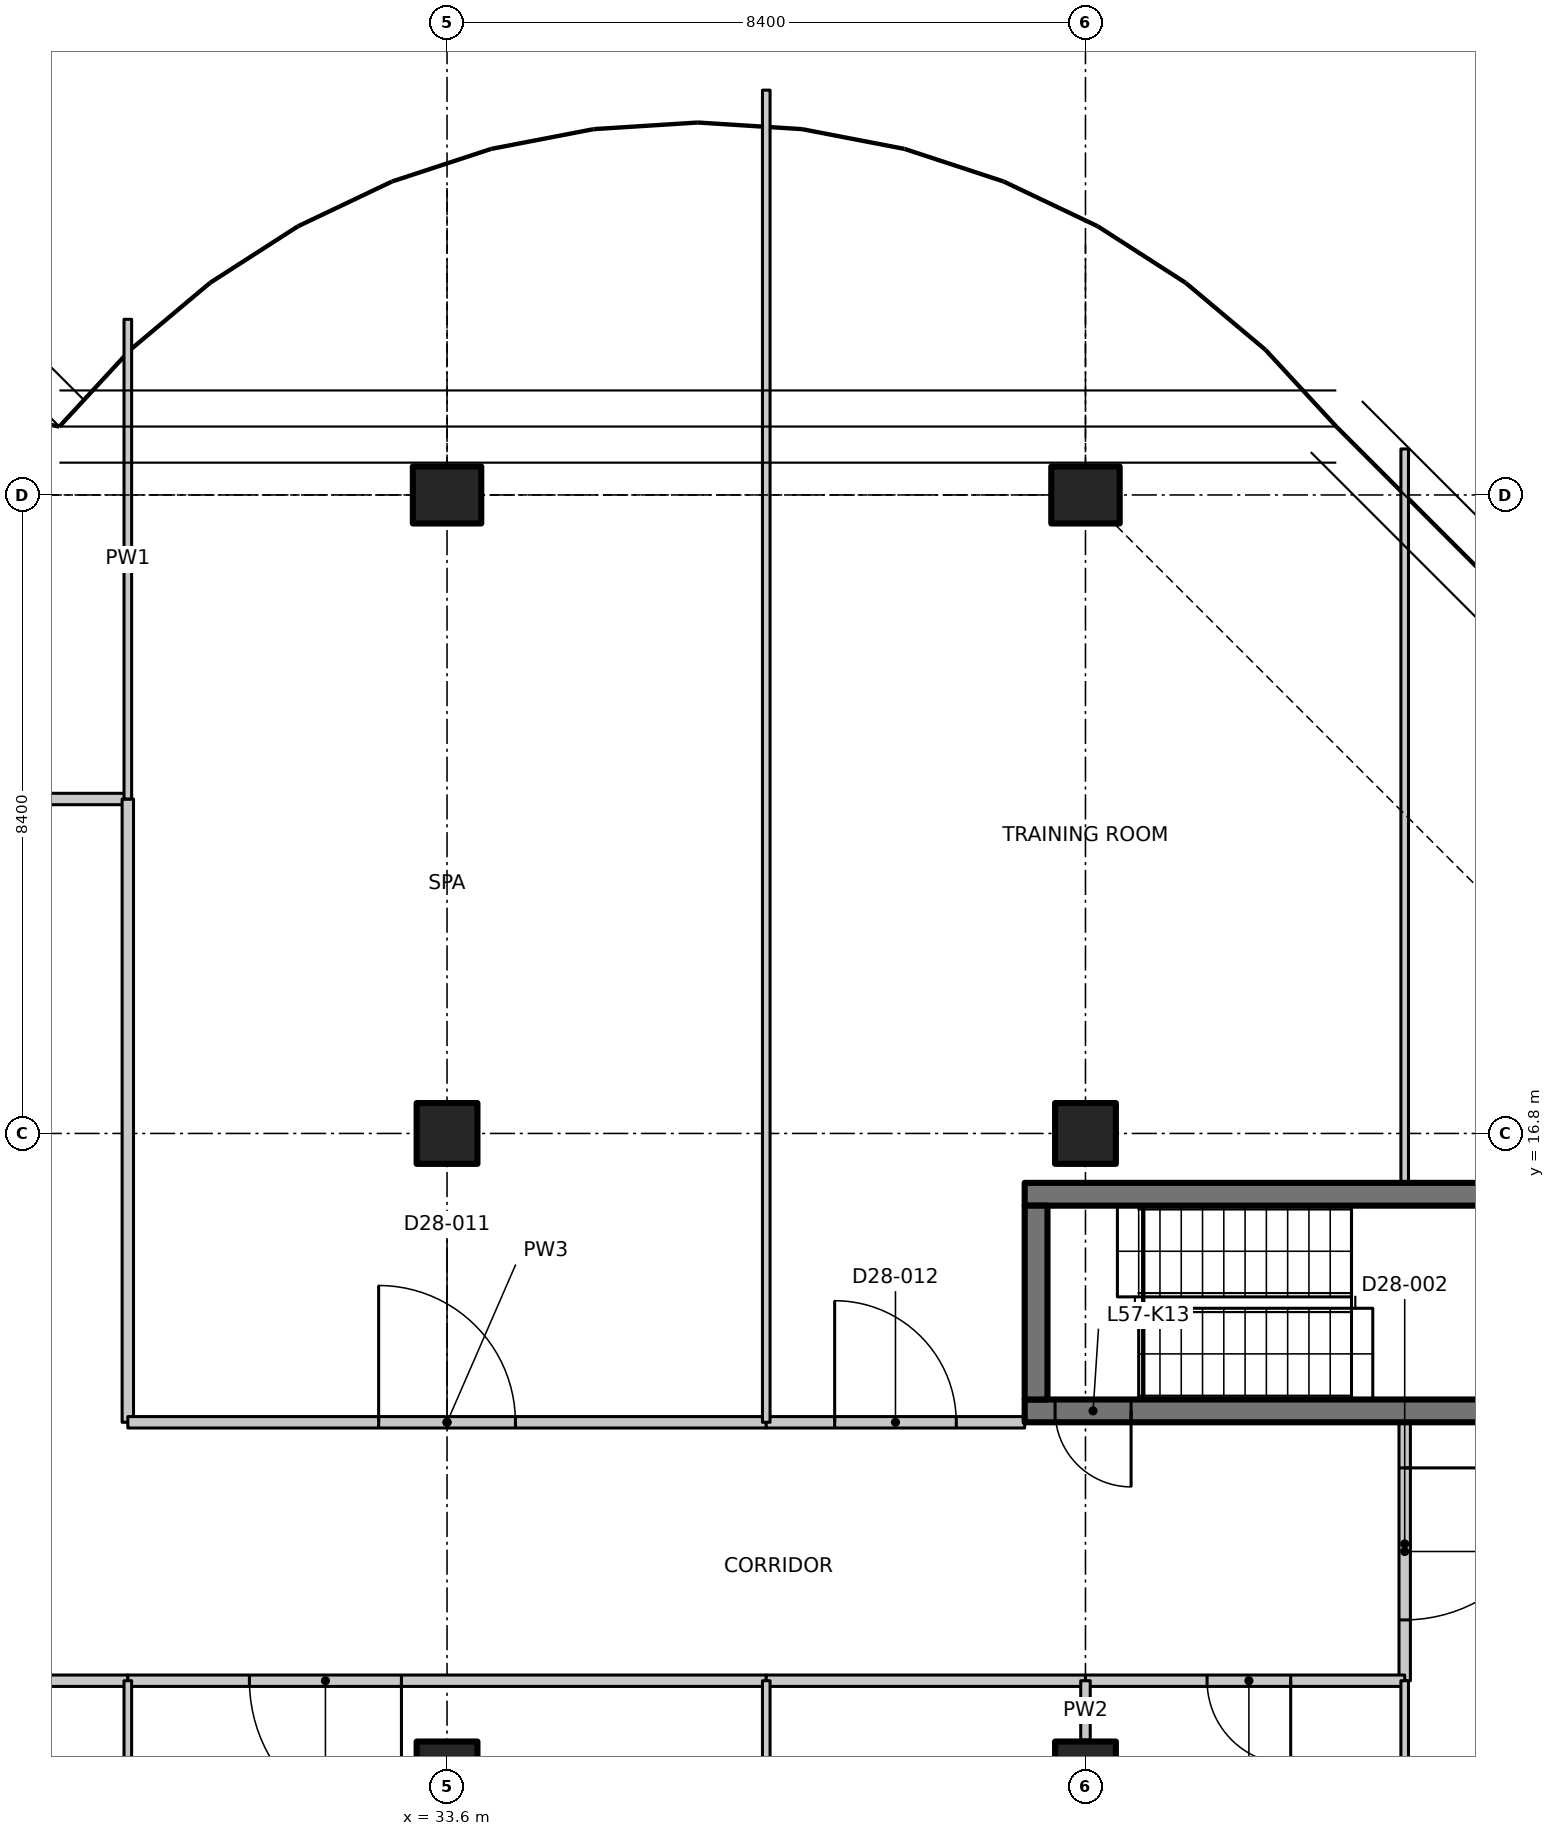
"""IFC4 building model, lengths in metres.
Left out: names, types, materials, properties, quantities, classifications, styles, units other than length and angle.
Written with IfcOpenShell. Run it as: python <this file> out.ifc"""

import sys

from ifc_helpers import new_model, si_unit, direction, frame, frame_2d, origin, origin_2d, place, context, subcontext, project, spatial, polyline, rectangle, outline, extrude, element, fill, save


model = new_model("IFC4")
c1 = context("Model", 3, precision=1e-05, world=origin(), true_north=direction((0.0, 1.0)))
c2 = subcontext(c1, "Body", "Model", "MODEL_VIEW")
j1 = project(units=[si_unit("LENGTHUNIT", "METRE"), si_unit("PLANEANGLEUNIT", "RADIAN")], contexts=[c1])
p1 = place(None, origin())
s1 = spatial("IfcSite", under=j1, at=p1, CompositionType="ELEMENT")
p2 = place(p1, origin())
s2 = spatial("IfcBuilding", under=s1, at=p2, CompositionType="ELEMENT")
p3 = place(p2, frame((0.0, 0.0, 226.5)))
s3 = spatial("IfcBuildingStorey", under=s2, at=p3, CompositionType="ELEMENT", Elevation=226.5)
for number, where, z_axis, x_axis in (
    (1, (33.6, 8.4, 0.0), (0.0, 0.0, 1.0), (1.0, 0.0, 0.0)),
    (2, (33.6, 16.8, 0.0), (0.0, 0.0, 1.0), (1.0, 0.0, 0.0)),
):
    element("IfcColumn", number, at=place(p3, frame(where, z_axis=z_axis, x_axis=x_axis)), inside=s3, PredefinedType="COLUMN", context=c2, shape_type="SweptSolid", body=[
        extrude(rectangle(XDim=0.8, YDim=0.8, at=origin_2d()), origin(), (0.0, 0.0, 1.0), 3.35),
    ])
p4 = place(p3, frame((33.6, 25.2, 0.0), z_axis=(0.0, 0.0, 1.0), x_axis=(0.0, 1.0, 0.0)))
e3 = element("IfcColumn", 3, at=p4, inside=s3, PredefinedType="COLUMN", context=c2, shape_type="SweptSolid", body=[
    extrude(rectangle(XDim=0.75, YDim=0.9, at=origin_2d()), origin(), (0.0, 0.0, 1.0), 3.35),
])
for number, where, z_axis, x_axis in (
    (4, (42.0, 8.4, 0.0), (0.0, 0.0, 1.0), (1.0, 0.0, 0.0)),
    (5, (42.0, 16.8, 0.0), (0.0, 0.0, 1.0), (1.0, 0.0, 0.0)),
):
    element("IfcColumn", number, at=place(p3, frame(where, z_axis=z_axis, x_axis=x_axis)), inside=s3, PredefinedType="COLUMN", context=c2, shape_type="SweptSolid", body=[
        extrude(rectangle(XDim=0.8, YDim=0.8, at=origin_2d()), origin(), (0.0, 0.0, 1.0), 3.35),
    ])
p5 = place(p3, frame((42.0, 25.2, 0.0), z_axis=(0.0, 0.0, 1.0), x_axis=(0.0, 1.0, 0.0)))
e6 = element("IfcColumn", 6, at=p5, inside=s3, PredefinedType="COLUMN", context=c2, shape_type="SweptSolid", body=[
    extrude(rectangle(XDim=0.75, YDim=0.9, at=origin_2d()), origin(), (0.0, 0.0, 1.0), 3.35),
])
p6 = place(p3, frame((49.4, 13.15, 0.0), z_axis=(0.0, 0.0, 1.0), x_axis=(-1.0, 0.0, 0.0)))
e7 = element("IfcWall", 7, at=p6, inside=s3, PredefinedType="SHEAR", context=c2, shape_type="SweptSolid", body=[
    extrude(rectangle(XDim=8.2, YDim=0.3, at=frame_2d((4.1, 0.0))), origin(), (0.0, 0.0, 1.0), 3.35),
])
p7 = place(p6, frame((6.8, 0.0, 0.0)))
e8 = element("IfcOpeningElement", 8, at=p7, cuts=e7, PredefinedType="OPENING", context=c2, shape_type="SweptSolid", body=[
    extrude(rectangle(XDim=1.0, YDim=2.1, at=frame_2d((0.5, 1.05))), frame((0.0, 0.16, 0.0), z_axis=(0.0, -1.0, 0.0), x_axis=(1.0, 0.0, 0.0)), (0.0, 0.0, 1.0), 0.32),
])
p8 = place(p3, frame((41.2, 16.0, 0.0), z_axis=(0.0, 0.0, 1.0), x_axis=(1.0, 0.0, 0.0)))
e9 = element("IfcWall", 9, at=p8, inside=s3, PredefinedType="SHEAR", context=c2, shape_type="SweptSolid", body=[
    extrude(rectangle(XDim=8.2, YDim=0.3, at=frame_2d((4.1, 0.0))), origin(), (0.0, 0.0, 1.0), 3.35),
])
p9 = place(p3, frame((41.35, 13.3, 0.0), z_axis=(0.0, 0.0, 1.0), x_axis=(0.0, 1.0, 0.0)))
e10 = element("IfcWall", 10, at=p9, inside=s3, PredefinedType="SHEAR", context=c2, shape_type="SweptSolid", body=[
    extrude(rectangle(XDim=2.55, YDim=0.3, at=frame_2d((1.275, 0.0))), origin(), (0.0, 0.0, 1.0), 3.35),
])
p10 = place(p3, frame((25.2, 21.2, 0.0), z_axis=(0.0, 0.0, 1.0), x_axis=(1.0, 0.0, 0.0)))
e11 = element("IfcWall", 11, at=p10, inside=s3, PredefinedType="PARTITIONING", context=c2, shape_type="SweptSolid", body=[
    extrude(rectangle(XDim=4.2, YDim=0.15, at=frame_2d((2.1, 0.0))), origin(), (0.0, 0.0, 1.0), 3.33),
])
p11 = place(p10, frame((1.5, 0.0, 0.0)))
e12 = element("IfcOpeningElement", 12, at=p11, cuts=e11, PredefinedType="OPENING", context=c2, shape_type="SweptSolid", body=[
    extrude(rectangle(XDim=1.0, YDim=2.1, at=frame_2d((0.5, 1.05))), frame((0.0, 0.085, 0.0), z_axis=(0.0, -1.0, 0.0), x_axis=(1.0, 0.0, 0.0)), (0.0, 0.0, 1.0), 0.17),
])
p12 = place(p3, frame((29.4, 9.6, 0.0), z_axis=(0.0, 0.0, 1.0), x_axis=(-1.0, 0.0, 0.0)))
e13 = element("IfcWall", 13, at=p12, inside=s3, PredefinedType="PARTITIONING", context=c2, shape_type="SweptSolid", body=[
    extrude(rectangle(XDim=4.2, YDim=0.15, at=frame_2d((2.1, 0.0))), origin(), (0.0, 0.0, 1.0), 3.33),
])
p13 = place(p3, frame((29.4, 21.2, 0.0), z_axis=(0.0, 0.0, 1.0), x_axis=(0.0, -1.0, 0.0)))
e14 = element("IfcWall", 14, at=p13, inside=s3, PredefinedType="PARTITIONING", context=c2, shape_type="SweptSolid", body=[
    extrude(rectangle(XDim=8.2, YDim=0.15, at=frame_2d((4.1, 0.0))), origin(), (0.0, 0.0, 1.0), 3.33),
])
p14 = place(p3, frame((29.4, 27.511, 0.0), z_axis=(0.0, 0.0, 1.0), x_axis=(0.0, -1.0, 0.0)))
e15 = element("IfcWall", 15, at=p14, inside=s3, PredefinedType="PARTITIONING", context=c2, shape_type="SweptSolid", body=[
    extrude(outline(polyline([(0.0, 0.0), (6.311, 0.0), (6.311, 3.33), (2.761, 3.33), (2.759, 2.98), (1.863, 2.98), (1.861, 3.33), (0.236, 3.33), (0.0, 3.33), (0.0, 0.0)])), frame((0.0, 0.05, 0.0), z_axis=(0.0, -1.0, 0.0), x_axis=(1.0, 0.0, 0.0)), (0.0, 0.0, 1.0), 0.1),
])
p15 = place(p3, frame((46.2, 13.0, 0.0), z_axis=(0.0, 0.0, 1.0), x_axis=(0.0, -1.0, 0.0)))
e16 = element("IfcWall", 16, at=p15, inside=s3, PredefinedType="PARTITIONING", context=c2, shape_type="SweptSolid", body=[
    extrude(rectangle(XDim=3.4, YDim=0.15, at=frame_2d((1.7, 0.0))), origin(), (0.0, 0.0, 1.0), 3.33),
])
p16 = place(p15, frame((0.6, 0.0, 0.0)))
e17 = element("IfcOpeningElement", 17, at=p16, cuts=e16, PredefinedType="OPENING", context=c2, shape_type="SweptSolid", body=[
    extrude(rectangle(XDim=2.0, YDim=2.4, at=frame_2d((1.0, 1.2))), frame((0.0, 0.085, 0.0), z_axis=(0.0, -1.0, 0.0), x_axis=(1.0, 0.0, 0.0)), (0.0, 0.0, 1.0), 0.17),
])
p17 = place(p3, frame((37.8, 9.6, 0.0), z_axis=(0.0, 0.0, 1.0), x_axis=(-1.0, 0.0, 0.0)))
e18 = element("IfcWall", 18, at=p17, inside=s3, PredefinedType="PARTITIONING", context=c2, shape_type="SweptSolid", body=[
    extrude(rectangle(XDim=8.4, YDim=0.15, at=frame_2d((4.2, 0.0))), origin(), (0.0, 0.0, 1.0), 3.33),
])
p18 = place(p17, frame((4.8, 0.0, 0.0)))
e19 = element("IfcOpeningElement", 19, at=p18, cuts=e18, PredefinedType="OPENING", context=c2, shape_type="SweptSolid", body=[
    extrude(rectangle(XDim=2.0, YDim=2.4, at=frame_2d((1.0, 1.2))), frame((0.0, 0.085, 0.0), z_axis=(0.0, -1.0, 0.0), x_axis=(1.0, 0.0, 0.0)), (0.0, 0.0, 1.0), 0.17),
])
p19 = place(p3, frame((42.0, 9.6, 0.0), z_axis=(0.0, 0.0, 1.0), x_axis=(-1.0, 0.0, 0.0)))
e20 = element("IfcWall", 20, at=p19, inside=s3, PredefinedType="PARTITIONING", context=c2, shape_type="SweptSolid", body=[
    extrude(rectangle(XDim=4.2, YDim=0.15, at=frame_2d((2.1, 0.0))), origin(), (0.0, 0.0, 1.0), 3.33),
])
p20 = place(p3, frame((46.2, 9.6, 0.0), z_axis=(0.0, 0.0, 1.0), x_axis=(-1.0, 0.0, 0.0)))
e21 = element("IfcWall", 21, at=p20, inside=s3, PredefinedType="PARTITIONING", context=c2, shape_type="SweptSolid", body=[
    extrude(rectangle(XDim=4.2, YDim=0.15, at=frame_2d((2.1, 0.0))), origin(), (0.0, 0.0, 1.0), 3.33),
])
p21 = place(p20, frame((1.5, 0.0, 0.0)))
e22 = element("IfcOpeningElement", 22, at=p21, cuts=e21, PredefinedType="OPENING", context=c2, shape_type="SweptSolid", body=[
    extrude(rectangle(XDim=1.1, YDim=2.1, at=frame_2d((0.55, 1.05))), frame((0.0, 0.085, 0.0), z_axis=(0.0, -1.0, 0.0), x_axis=(1.0, 0.0, 0.0)), (0.0, 0.0, 1.0), 0.17),
])
p22 = place(p3, frame((29.4, 13.0, 0.0), z_axis=(0.0, 0.0, 1.0), x_axis=(1.0, 0.0, 0.0)))
e23 = element("IfcWall", 23, at=p22, inside=s3, PredefinedType="PARTITIONING", context=c2, shape_type="SweptSolid", body=[
    extrude(rectangle(XDim=8.4, YDim=0.15, at=frame_2d((4.2, 0.0))), origin(), (0.0, 0.0, 1.0), 3.33),
])
p23 = place(p22, frame((3.3, 0.0, 0.0)))
e24 = element("IfcOpeningElement", 24, at=p23, cuts=e23, PredefinedType="OPENING", context=c2, shape_type="SweptSolid", body=[
    extrude(rectangle(XDim=1.8, YDim=2.1, at=frame_2d((0.9, 1.05))), frame((0.0, 0.085, 0.0), z_axis=(0.0, -1.0, 0.0), x_axis=(1.0, 0.0, 0.0)), (0.0, 0.0, 1.0), 0.17),
])
p24 = place(p3, frame((37.8, 13.0, 0.0), z_axis=(0.0, 0.0, 1.0), x_axis=(1.0, 0.0, 0.0)))
e25 = element("IfcWall", 25, at=p24, inside=s3, PredefinedType="PARTITIONING", context=c2, shape_type="SweptSolid", body=[
    extrude(rectangle(XDim=3.4, YDim=0.15, at=frame_2d((1.7, 0.0))), origin(), (0.0, 0.0, 1.0), 3.33),
])
p25 = place(p24, frame((0.9, 0.0, 0.0)))
e26 = element("IfcOpeningElement", 26, at=p25, cuts=e25, PredefinedType="OPENING", context=c2, shape_type="SweptSolid", body=[
    extrude(rectangle(XDim=1.6, YDim=2.1, at=frame_2d((0.8, 1.05))), frame((0.0, 0.085, 0.0), z_axis=(0.0, -1.0, 0.0), x_axis=(1.0, 0.0, 0.0)), (0.0, 0.0, 1.0), 0.17),
])
p26 = place(p3, frame((46.2, -0.2, 0.0), z_axis=(0.0, 0.0, 1.0), x_axis=(0.0, 1.0, 0.0)))
e27 = element("IfcWall", 27, at=p26, inside=s3, PredefinedType="PARTITIONING", context=c2, shape_type="SweptSolid", body=[
    extrude(outline(polyline([(0.0, 0.0), (9.8, 0.0), (9.8, 3.33), (5.066, 3.33), (5.064, 2.98), (3.736, 2.98), (3.734, 3.33), (0.0, 3.33), (0.0, 0.0)])), frame((0.0, 0.05, 0.0), z_axis=(0.0, -1.0, 0.0), x_axis=(1.0, 0.0, 0.0)), (0.0, 0.0, 1.0), 0.1),
])
p27 = place(p3, frame((46.2, 16.15, 0.0), z_axis=(0.0, 0.0, 1.0), x_axis=(0.0, 1.0, 0.0)))
e28 = element("IfcWall", 28, at=p27, inside=s3, PredefinedType="PARTITIONING", context=c2, shape_type="SweptSolid", body=[
    extrude(outline(polyline([(0.0, 0.0), (9.656, 0.0), (9.656, 3.33), (9.25, 3.33), (5.516, 3.33), (5.514, 2.98), (4.186, 2.98), (4.184, 3.33), (0.0, 3.33), (0.0, 0.0)])), frame((0.0, 0.05, 0.0), z_axis=(0.0, -1.0, 0.0), x_axis=(1.0, 0.0, 0.0)), (0.0, 0.0, 1.0), 0.1),
])
p28 = place(p3, frame((37.8, 9.6, 0.0), z_axis=(0.0, 0.0, 1.0), x_axis=(0.0, -1.0, 0.0)))
e29 = element("IfcWall", 29, at=p28, inside=s3, PredefinedType="PARTITIONING", context=c2, shape_type="SweptSolid", body=[
    extrude(rectangle(XDim=3.6, YDim=0.1, at=frame_2d((1.8, 0.0))), origin(), (0.0, 0.0, 1.0), 3.33),
])
p29 = place(p3, frame((29.4, 5.4, 0.0), z_axis=(0.0, 0.0, 1.0), x_axis=(0.0, 1.0, 0.0)))
e30 = element("IfcWall", 30, at=p29, inside=s3, PredefinedType="PARTITIONING", context=c2, shape_type="SweptSolid", body=[
    extrude(rectangle(XDim=4.2, YDim=0.1, at=frame_2d((2.1, 0.0))), origin(), (0.0, 0.0, 1.0), 3.33),
])
p30 = place(p29, frame((1.8, 0.0, 0.0)))
e31 = element("IfcOpeningElement", 31, at=p30, cuts=e30, PredefinedType="OPENING", context=c2, shape_type="SweptSolid", body=[
    extrude(rectangle(XDim=0.9, YDim=2.1, at=frame_2d((0.45, 1.05))), frame((0.0, 0.06, 0.0), z_axis=(0.0, -1.0, 0.0), x_axis=(1.0, 0.0, 0.0)), (0.0, 0.0, 1.0), 0.12),
])
p31 = place(p3, frame((42.0, 9.6, 0.0), z_axis=(0.0, 0.0, 1.0), x_axis=(0.0, -1.0, 0.0)))
e32 = element("IfcWall", 32, at=p31, inside=s3, PredefinedType="PARTITIONING", context=c2, shape_type="SweptSolid", body=[
    extrude(rectangle(XDim=0.78, YDim=0.125, at=frame_2d((0.39, 0.0))), origin(), (0.0, 0.0, 1.0), 3.33),
])
p32 = place(p3, frame((37.8, 30.526, 0.0), z_axis=(0.0, 0.0, 1.0), x_axis=(0.0, -1.0, 0.0)))
e33 = element("IfcWall", 33, at=p32, inside=s3, PredefinedType="PARTITIONING", context=c2, shape_type="SweptSolid", body=[
    extrude(outline(polyline([(0.0, 0.0), (17.526, 0.0), (17.526, 3.33), (5.776, 3.33), (5.774, 2.98), (4.878, 2.98), (4.876, 3.33), (0.283, 3.33), (0.0, 3.33), (0.0, 0.0)])), frame((0.0, 0.05, 0.0), z_axis=(0.0, -1.0, 0.0), x_axis=(1.0, 0.0, 0.0)), (0.0, 0.0, 1.0), 0.1),
])
p33 = place(p7, origin())
e34 = element("IfcDoor", 34, at=p33, inside=s3, OperationType="SINGLE_SWING_LEFT", PredefinedType="DOOR", context=c2, shape_type="SweptSolid", body=[
    extrude(rectangle(XDim=1.0, YDim=2.1, at=frame_2d((0.5, 1.05))), frame((0.0, 0.025, 0.0), z_axis=(0.0, -1.0, 0.0), x_axis=(1.0, 0.0, 0.0)), (0.0, 0.0, 1.0), 0.05),
])
fill(e8, e34)
p34 = place(p16, origin())
e35 = element("IfcDoor", 35, at=p34, inside=s3, OperationType="DOUBLE_DOOR_SINGLE_SWING", PredefinedType="DOOR", context=c2, shape_type="SweptSolid", body=[
    extrude(rectangle(XDim=2.0, YDim=2.4, at=frame_2d((1.0, 1.2))), frame((0.0, 0.025, 0.0), z_axis=(0.0, -1.0, 0.0), x_axis=(1.0, 0.0, 0.0)), (0.0, 0.0, 1.0), 0.05),
])
fill(e17, e35)
p35 = place(p18, origin())
e36 = element("IfcDoor", 36, at=p35, inside=s3, OperationType="DOUBLE_DOOR_SINGLE_SWING", PredefinedType="DOOR", context=c2, shape_type="SweptSolid", body=[
    extrude(rectangle(XDim=2.0, YDim=2.4, at=frame_2d((1.0, 1.2))), frame((0.0, 0.025, 0.0), z_axis=(0.0, -1.0, 0.0), x_axis=(1.0, 0.0, 0.0)), (0.0, 0.0, 1.0), 0.05),
])
fill(e19, e36)
p36 = place(p21, origin())
e37 = element("IfcDoor", 37, at=p36, inside=s3, OperationType="SINGLE_SWING_LEFT", PredefinedType="DOOR", context=c2, shape_type="SweptSolid", body=[
    extrude(rectangle(XDim=1.1, YDim=2.1, at=frame_2d((0.55, 1.05))), frame((0.0, 0.025, 0.0), z_axis=(0.0, -1.0, 0.0), x_axis=(1.0, 0.0, 0.0)), (0.0, 0.0, 1.0), 0.05),
])
fill(e22, e37)
p37 = place(p23, origin())
e38 = element("IfcDoor", 38, at=p37, inside=s3, OperationType="DOUBLE_DOOR_SINGLE_SWING", PredefinedType="DOOR", context=c2, shape_type="SweptSolid", body=[
    extrude(rectangle(XDim=1.8, YDim=2.1, at=frame_2d((0.9, 1.05))), frame((0.0, 0.025, 0.0), z_axis=(0.0, -1.0, 0.0), x_axis=(1.0, 0.0, 0.0)), (0.0, 0.0, 1.0), 0.05),
])
fill(e24, e38)
p38 = place(p25, origin())
e39 = element("IfcDoor", 39, at=p38, inside=s3, OperationType="DOUBLE_DOOR_SINGLE_SWING", PredefinedType="DOOR", context=c2, shape_type="SweptSolid", body=[
    extrude(rectangle(XDim=1.6, YDim=2.1, at=frame_2d((0.8, 1.05))), frame((0.0, 0.025, 0.0), z_axis=(0.0, -1.0, 0.0), x_axis=(1.0, 0.0, 0.0)), (0.0, 0.0, 1.0), 0.05),
])
fill(e26, e39)
save(model, sys.argv[1])
